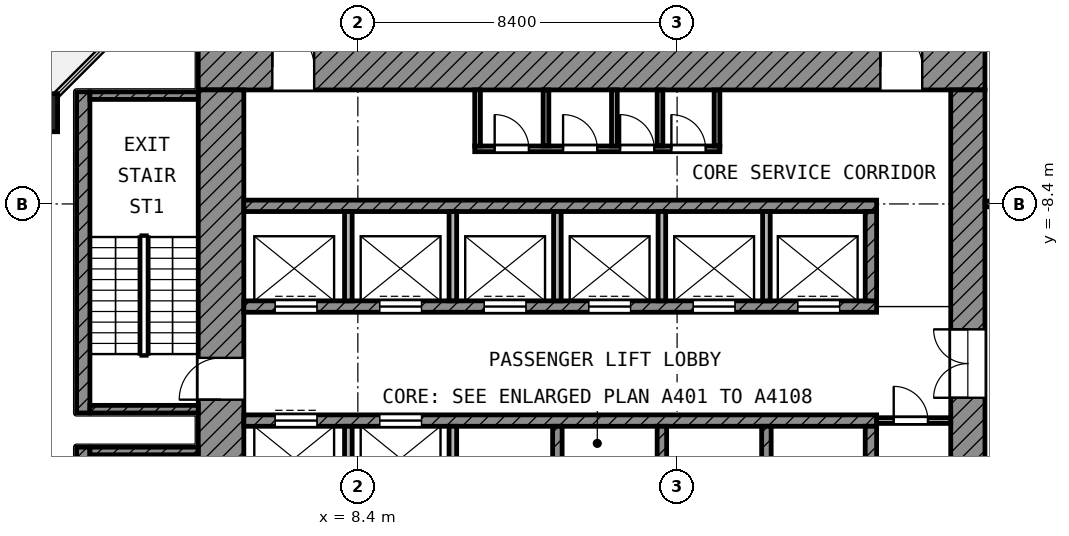
"""IFC4 building model, lengths in metres.
Left out: names, types, materials, properties, quantities, classifications, styles, units other than length and angle.
Written with IfcOpenShell. Run it as: python <this file> out.ifc"""

import sys

from ifc_helpers import new_model, si_unit, direction, frame, frame_2d, origin, origin_2d, place, context, subcontext, project, spatial, rectangle, extrude, element, fill, save


model = new_model("IFC4")
c1 = context("Model", 3, precision=1e-05, world=origin(), true_north=direction((0.0, 1.0)))
c2 = subcontext(c1, "Body", "Model", "MODEL_VIEW")
j1 = project(units=[si_unit("LENGTHUNIT", "METRE"), si_unit("PLANEANGLEUNIT", "RADIAN")], contexts=[c1])
p1 = place(None, origin())
s1 = spatial("IfcSite", under=j1, at=p1, CompositionType="ELEMENT")
p2 = place(p1, origin())
s2 = spatial("IfcBuilding", under=s1, at=p2, CompositionType="ELEMENT")
p3 = place(p2, frame((0.0, 0.0, 158.4)))
s3 = spatial("IfcBuildingStorey", under=s2, at=p3, CompositionType="ELEMENT", Elevation=158.4)
p4 = place(p3, frame((0.0, -6.0, 0.0), z_axis=(0.0, 0.0, 1.0), x_axis=(1.0, 0.0, 0.0)))
e1 = element("IfcColumn", 1, at=p4, inside=s3, PredefinedType="COLUMN", context=c2, shape_type="SweptSolid", body=[
    extrude(rectangle(XDim=1.0, YDim=1.0, at=origin_2d()), origin(), (0.0, 0.0, 1.0), 4.2),
])
p5 = place(p3, frame((4.2, -4.8, 0.0), z_axis=(0.0, 0.0, 1.0), x_axis=(1.0, 0.0, 0.0)))
e2 = element("IfcWall", 2, at=p5, inside=s3, PredefinedType="SHEAR", context=c2, shape_type="SweptSolid", body=[
    extrude(rectangle(XDim=20.7, YDim=1.2, at=frame_2d((10.35, 0.0))), origin(), (0.0, 0.0, 1.0), 3.6),
])
p6 = place(p5, frame((1.95, 0.0, 0.0)))
e3 = element("IfcOpeningElement", 3, at=p6, cuts=e2, PredefinedType="OPENING", context=c2, shape_type="SweptSolid", body=[
    extrude(rectangle(XDim=1.1, YDim=2.1, at=frame_2d((0.55, 1.05))), frame((0.0, 0.61, 0.0), z_axis=(0.0, -1.0, 0.0), x_axis=(1.0, 0.0, 0.0)), (0.0, 0.0, 1.0), 1.22),
])
p7 = place(p5, frame((17.95, 0.0, 0.0)))
e4 = element("IfcOpeningElement", 4, at=p7, cuts=e2, PredefinedType="OPENING", context=c2, shape_type="SweptSolid", body=[
    extrude(rectangle(XDim=1.1, YDim=2.1, at=frame_2d((0.55, 1.05))), frame((0.0, 0.61, 0.0), z_axis=(0.0, -1.0, 0.0), x_axis=(1.0, 0.0, 0.0)), (0.0, 0.0, 1.0), 1.22),
])
p8 = place(p3, frame((4.8, -24.9, 0.0), z_axis=(0.0, 0.0, 1.0), x_axis=(0.0, 1.0, 0.0)))
e5 = element("IfcWall", 5, at=p8, inside=s3, PredefinedType="SHEAR", context=c2, shape_type="SweptSolid", body=[
    extrude(rectangle(XDim=19.5, YDim=1.2, at=frame_2d((9.75, 0.0))), origin(), (0.0, 0.0, 1.0), 3.6),
])
p9 = place(p8, frame((11.35, 0.0, 0.0)))
e6 = element("IfcOpeningElement", 6, at=p9, cuts=e5, PredefinedType="OPENING", context=c2, shape_type="SweptSolid", body=[
    extrude(rectangle(XDim=1.1, YDim=2.1, at=frame_2d((0.55, 1.05))), frame((0.0, 0.61, 0.0), z_axis=(0.0, -1.0, 0.0), x_axis=(1.0, 0.0, 0.0)), (0.0, 0.0, 1.0), 1.22),
])
p10 = place(p8, frame((2.05, 0.0, 0.0)))
e7 = element("IfcOpeningElement", 7, at=p10, cuts=e5, PredefinedType="OPENING", context=c2, shape_type="SweptSolid", body=[
    extrude(rectangle(XDim=1.1, YDim=2.1, at=frame_2d((0.55, 1.05))), frame((0.0, 0.61, 0.0), z_axis=(0.0, -1.0, 0.0), x_axis=(1.0, 0.0, 0.0)), (0.0, 0.0, 1.0), 1.22),
])
p11 = place(p3, frame((24.45, -24.0, 0.0), z_axis=(0.0, 0.0, 1.0), x_axis=(0.0, 1.0, 0.0)))
e8 = element("IfcWall", 8, at=p11, inside=s3, PredefinedType="SHEAR", context=c2, shape_type="SweptSolid", body=[
    extrude(rectangle(XDim=18.6, YDim=0.9, at=frame_2d((9.3, 0.0))), origin(), (0.0, 0.0, 1.0), 3.6),
])
p12 = place(p11, frame((10.5, 0.0, 0.0)))
e9 = element("IfcOpeningElement", 9, at=p12, cuts=e8, PredefinedType="OPENING", context=c2, shape_type="SweptSolid", body=[
    extrude(rectangle(XDim=1.8, YDim=2.1, at=frame_2d((0.9, 1.05))), frame((0.0, 0.46, 0.0), z_axis=(0.0, -1.0, 0.0), x_axis=(1.0, 0.0, 0.0)), (0.0, 0.0, 1.0), 0.92),
])
p13 = place(p3, frame((5.4, -8.45, 0.0), z_axis=(0.0, 0.0, 1.0), x_axis=(1.0, 0.0, 0.0)))
e10 = element("IfcWall", 10, at=p13, inside=s3, PredefinedType="SHEAR", context=c2, shape_type="SweptSolid", body=[
    extrude(rectangle(XDim=16.65, YDim=0.3, at=frame_2d((8.325, 0.0))), origin(), (0.0, 0.0, 1.0), 3.6),
])
p14 = place(p3, frame((5.4, -11.1, 0.0), z_axis=(0.0, 0.0, 1.0), x_axis=(1.0, 0.0, 0.0)))
e11 = element("IfcWall", 11, at=p14, inside=s3, PredefinedType="SHEAR", context=c2, shape_type="SweptSolid", body=[
    extrude(rectangle(XDim=16.65, YDim=0.3, at=frame_2d((8.325, 0.0))), origin(), (0.0, 0.0, 1.0), 3.6),
])
p15 = place(p14, frame((0.825, 0.0, 0.0)))
e12 = element("IfcOpeningElement", 12, at=p15, cuts=e11, PredefinedType="OPENING", context=c2, shape_type="SweptSolid", body=[
    extrude(rectangle(XDim=1.1, YDim=2.1, at=frame_2d((0.55, 1.05))), frame((0.0, 0.16, 0.0), z_axis=(0.0, -1.0, 0.0), x_axis=(1.0, 0.0, 0.0)), (0.0, 0.0, 1.0), 0.32),
])
p16 = place(p14, frame((3.575, 0.0, 0.0)))
e13 = element("IfcOpeningElement", 13, at=p16, cuts=e11, PredefinedType="OPENING", context=c2, shape_type="SweptSolid", body=[
    extrude(rectangle(XDim=1.1, YDim=2.1, at=frame_2d((0.55, 1.05))), frame((0.0, 0.16, 0.0), z_axis=(0.0, -1.0, 0.0), x_axis=(1.0, 0.0, 0.0)), (0.0, 0.0, 1.0), 0.32),
])
p17 = place(p14, frame((6.325, 0.0, 0.0)))
e14 = element("IfcOpeningElement", 14, at=p17, cuts=e11, PredefinedType="OPENING", context=c2, shape_type="SweptSolid", body=[
    extrude(rectangle(XDim=1.1, YDim=2.1, at=frame_2d((0.55, 1.05))), frame((0.0, 0.16, 0.0), z_axis=(0.0, -1.0, 0.0), x_axis=(1.0, 0.0, 0.0)), (0.0, 0.0, 1.0), 0.32),
])
p18 = place(p14, frame((9.075, 0.0, 0.0)))
e15 = element("IfcOpeningElement", 15, at=p18, cuts=e11, PredefinedType="OPENING", context=c2, shape_type="SweptSolid", body=[
    extrude(rectangle(XDim=1.1, YDim=2.1, at=frame_2d((0.55, 1.05))), frame((0.0, 0.16, 0.0), z_axis=(0.0, -1.0, 0.0), x_axis=(1.0, 0.0, 0.0)), (0.0, 0.0, 1.0), 0.32),
])
p19 = place(p14, frame((11.825, 0.0, 0.0)))
e16 = element("IfcOpeningElement", 16, at=p19, cuts=e11, PredefinedType="OPENING", context=c2, shape_type="SweptSolid", body=[
    extrude(rectangle(XDim=1.1, YDim=2.1, at=frame_2d((0.55, 1.05))), frame((0.0, 0.16, 0.0), z_axis=(0.0, -1.0, 0.0), x_axis=(1.0, 0.0, 0.0)), (0.0, 0.0, 1.0), 0.32),
])
p20 = place(p14, frame((14.575, 0.0, 0.0)))
e17 = element("IfcOpeningElement", 17, at=p20, cuts=e11, PredefinedType="OPENING", context=c2, shape_type="SweptSolid", body=[
    extrude(rectangle(XDim=1.1, YDim=2.1, at=frame_2d((0.55, 1.05))), frame((0.0, 0.16, 0.0), z_axis=(0.0, -1.0, 0.0), x_axis=(1.0, 0.0, 0.0)), (0.0, 0.0, 1.0), 0.32),
])
p21 = place(p3, frame((5.4, -14.1, 0.0), z_axis=(0.0, 0.0, 1.0), x_axis=(1.0, 0.0, 0.0)))
e18 = element("IfcWall", 18, at=p21, inside=s3, PredefinedType="SHEAR", context=c2, shape_type="SweptSolid", body=[
    extrude(rectangle(XDim=16.65, YDim=0.3, at=frame_2d((8.325, 0.0))), origin(), (0.0, 0.0, 1.0), 3.6),
])
p22 = place(p21, frame((0.825, 0.0, 0.0)))
e19 = element("IfcOpeningElement", 19, at=p22, cuts=e18, PredefinedType="OPENING", context=c2, shape_type="SweptSolid", body=[
    extrude(rectangle(XDim=1.1, YDim=2.1, at=frame_2d((0.55, 1.05))), frame((0.0, 0.16, 0.0), z_axis=(0.0, -1.0, 0.0), x_axis=(1.0, 0.0, 0.0)), (0.0, 0.0, 1.0), 0.32),
])
p23 = place(p21, frame((3.575, 0.0, 0.0)))
e20 = element("IfcOpeningElement", 20, at=p23, cuts=e18, PredefinedType="OPENING", context=c2, shape_type="SweptSolid", body=[
    extrude(rectangle(XDim=1.1, YDim=2.1, at=frame_2d((0.55, 1.05))), frame((0.0, 0.16, 0.0), z_axis=(0.0, -1.0, 0.0), x_axis=(1.0, 0.0, 0.0)), (0.0, 0.0, 1.0), 0.32),
])
p24 = place(p3, frame((21.9, -10.95, 0.0), z_axis=(0.0, 0.0, 1.0), x_axis=(0.0, 1.0, 0.0)))
e21 = element("IfcWall", 21, at=p24, inside=s3, PredefinedType="SHEAR", context=c2, shape_type="SweptSolid", body=[
    extrude(rectangle(XDim=2.35, YDim=0.3, at=frame_2d((1.175, 0.0))), origin(), (0.0, 0.0, 1.0), 3.6),
])
p25 = place(p3, frame((21.9, -16.6, 0.0), z_axis=(0.0, 0.0, 1.0), x_axis=(0.0, 1.0, 0.0)))
e22 = element("IfcWall", 22, at=p25, inside=s3, PredefinedType="SHEAR", context=c2, shape_type="SweptSolid", body=[
    extrude(rectangle(XDim=2.35, YDim=0.3, at=frame_2d((1.175, 0.0))), origin(), (0.0, 0.0, 1.0), 3.6),
])
for number, where, z_axis, x_axis in (
    (23, (8.15, -10.95, 0.0), (0.0, 0.0, 1.0), (0.0, 1.0, 0.0)),
    (24, (10.9, -10.95, 0.0), (0.0, 0.0, 1.0), (0.0, 1.0, 0.0)),
    (25, (13.65, -10.95, 0.0), (0.0, 0.0, 1.0), (0.0, 1.0, 0.0)),
    (26, (16.4, -10.95, 0.0), (0.0, 0.0, 1.0), (0.0, 1.0, 0.0)),
    (27, (19.15, -10.95, 0.0), (0.0, 0.0, 1.0), (0.0, 1.0, 0.0)),
):
    element("IfcWall", number, at=place(p3, frame(where, z_axis=z_axis, x_axis=x_axis)), inside=s3, PredefinedType="PARTITIONING", context=c2, shape_type="SweptSolid", body=[
        extrude(rectangle(XDim=2.35, YDim=0.2, at=frame_2d((1.175, 0.0))), origin(), (0.0, 0.0, 1.0), 3.6),
    ])
for number, where, z_axis, x_axis in (
    (28, (8.15, -16.6, 0.0), (0.0, 0.0, 1.0), (0.0, 1.0, 0.0)),
    (29, (10.9, -16.6, 0.0), (0.0, 0.0, 1.0), (0.0, 1.0, 0.0)),
):
    element("IfcWall", number, at=place(p3, frame(where, z_axis=z_axis, x_axis=x_axis)), inside=s3, PredefinedType="PARTITIONING", context=c2, shape_type="SweptSolid", body=[
        extrude(rectangle(XDim=2.35, YDim=0.2, at=frame_2d((1.175, 0.0))), origin(), (0.0, 0.0, 1.0), 3.6),
    ])
for number, where, z_axis, x_axis in (
    (30, (13.65, -16.6, 0.0), (0.0, 0.0, 1.0), (0.0, 1.0, 0.0)),
    (31, (16.4, -16.6, 0.0), (0.0, 0.0, 1.0), (0.0, 1.0, 0.0)),
    (32, (19.15, -16.6, 0.0), (0.0, 0.0, 1.0), (0.0, 1.0, 0.0)),
):
    element("IfcWall", number, at=place(p3, frame(where, z_axis=z_axis, x_axis=x_axis)), inside=s3, PredefinedType="SHEAR", context=c2, shape_type="SweptSolid", body=[
        extrude(rectangle(XDim=2.35, YDim=0.25, at=frame_2d((1.175, 0.0))), origin(), (0.0, 0.0, 1.0), 3.6),
    ])
p26 = place(p3, frame((22.05, -14.1, 0.0), z_axis=(0.0, 0.0, 1.0), x_axis=(1.0, 0.0, 0.0)))
e33 = element("IfcWall", 33, at=p26, inside=s3, PredefinedType="PARTITIONING", context=c2, shape_type="SweptSolid", body=[
    extrude(rectangle(XDim=1.95, YDim=0.15, at=frame_2d((0.975, 0.0))), origin(), (0.0, 0.0, 1.0), 3.6),
])
p27 = place(p26, frame((0.45, 0.0, 0.0)))
e34 = element("IfcOpeningElement", 34, at=p27, cuts=e33, PredefinedType="OPENING", context=c2, shape_type="SweptSolid", body=[
    extrude(rectangle(XDim=0.9, YDim=2.1, at=frame_2d((0.45, 1.05))), frame((0.0, 0.085, 0.0), z_axis=(0.0, -1.0, 0.0), x_axis=(1.0, 0.0, 0.0)), (0.0, 0.0, 1.0), 0.17),
])
p28 = place(p3, frame((11.475, -6.95, 0.0), z_axis=(0.0, 0.0, 1.0), x_axis=(1.0, 0.0, 0.0)))
e35 = element("IfcWall", 35, at=p28, inside=s3, PredefinedType="PARTITIONING", context=c2, shape_type="SweptSolid", body=[
    extrude(rectangle(XDim=6.45, YDim=0.15, at=frame_2d((3.225, 0.0))), origin(), (0.0, 0.0, 1.0), 3.6),
])
p29 = place(p28, frame((0.525, 0.0, 0.0)))
e36 = element("IfcOpeningElement", 36, at=p29, cuts=e35, PredefinedType="OPENING", context=c2, shape_type="SweptSolid", body=[
    extrude(rectangle(XDim=0.9, YDim=2.1, at=frame_2d((0.45, 1.05))), frame((0.0, 0.085, 0.0), z_axis=(0.0, -1.0, 0.0), x_axis=(1.0, 0.0, 0.0)), (0.0, 0.0, 1.0), 0.17),
])
p30 = place(p28, frame((2.325, 0.0, 0.0)))
e37 = element("IfcOpeningElement", 37, at=p30, cuts=e35, PredefinedType="OPENING", context=c2, shape_type="SweptSolid", body=[
    extrude(rectangle(XDim=0.9, YDim=2.1, at=frame_2d((0.45, 1.05))), frame((0.0, 0.085, 0.0), z_axis=(0.0, -1.0, 0.0), x_axis=(1.0, 0.0, 0.0)), (0.0, 0.0, 1.0), 0.17),
])
p31 = place(p28, frame((3.825, 0.0, 0.0)))
e38 = element("IfcOpeningElement", 38, at=p31, cuts=e35, PredefinedType="OPENING", context=c2, shape_type="SweptSolid", body=[
    extrude(rectangle(XDim=0.9, YDim=2.1, at=frame_2d((0.45, 1.05))), frame((0.0, 0.085, 0.0), z_axis=(0.0, -1.0, 0.0), x_axis=(1.0, 0.0, 0.0)), (0.0, 0.0, 1.0), 0.17),
])
p32 = place(p28, frame((5.175, 0.0, 0.0)))
e39 = element("IfcOpeningElement", 39, at=p32, cuts=e35, PredefinedType="OPENING", context=c2, shape_type="SweptSolid", body=[
    extrude(rectangle(XDim=0.9, YDim=2.1, at=frame_2d((0.45, 1.05))), frame((0.0, 0.085, 0.0), z_axis=(0.0, -1.0, 0.0), x_axis=(1.0, 0.0, 0.0)), (0.0, 0.0, 1.0), 0.17),
])
for number, where, z_axis, x_axis in (
    (40, (11.55, -6.875, 0.0), (0.0, 0.0, 1.0), (0.0, 1.0, 0.0)),
    (41, (13.35, -6.875, 0.0), (0.0, 0.0, 1.0), (0.0, 1.0, 0.0)),
    (42, (15.15, -6.875, 0.0), (0.0, 0.0, 1.0), (0.0, 1.0, 0.0)),
    (43, (16.35, -6.875, 0.0), (0.0, 0.0, 1.0), (0.0, 1.0, 0.0)),
    (44, (17.85, -6.875, 0.0), (0.0, 0.0, 1.0), (0.0, 1.0, 0.0)),
):
    element("IfcWall", number, at=place(p3, frame(where, z_axis=z_axis, x_axis=x_axis)), inside=s3, PredefinedType="PARTITIONING", context=c2, shape_type="SweptSolid", body=[
        extrude(rectangle(XDim=1.475, YDim=0.15, at=frame_2d((0.738, 0.0))), origin(), (0.0, 0.0, 1.0), 3.6),
    ])
p33 = place(p3, frame((1.175, -13.9, 0.0), z_axis=(0.0, 0.0, 1.0), x_axis=(0.0, 1.0, 0.0)))
e45 = element("IfcWall", 45, at=p33, inside=s3, PredefinedType="SHEAR", context=c2, shape_type="SweptSolid", body=[
    extrude(rectangle(XDim=8.45, YDim=0.35, at=frame_2d((4.225, 0.0))), origin(), (0.0, 0.0, 1.0), 3.6),
])
for number, where, z_axis, x_axis in (
    (46, (1.35, -5.55, 0.0), (0.0, 0.0, 1.0), (1.0, 0.0, 0.0)),
    (47, (1.35, -13.8, 0.0), (0.0, 0.0, 1.0), (1.0, 0.0, 0.0)),
):
    element("IfcWall", number, at=place(p3, frame(where, z_axis=z_axis, x_axis=x_axis)), inside=s3, PredefinedType="SHEAR", context=c2, shape_type="SweptSolid", body=[
        extrude(rectangle(XDim=2.85, YDim=0.2, at=frame_2d((1.425, 0.0))), origin(), (0.0, 0.0, 1.0), 3.6),
    ])
p34 = place(p3, frame((1.175, -23.25, 0.0), z_axis=(0.0, 0.0, 1.0), x_axis=(0.0, 1.0, 0.0)))
e48 = element("IfcWall", 48, at=p34, inside=s3, PredefinedType="SHEAR", context=c2, shape_type="SweptSolid", body=[
    extrude(rectangle(XDim=8.45, YDim=0.35, at=frame_2d((4.225, 0.0))), origin(), (0.0, 0.0, 1.0), 3.6),
])
p35 = place(p3, frame((1.35, -14.9, 0.0), z_axis=(0.0, 0.0, 1.0), x_axis=(1.0, 0.0, 0.0)))
e49 = element("IfcWall", 49, at=p35, inside=s3, PredefinedType="SHEAR", context=c2, shape_type="SweptSolid", body=[
    extrude(rectangle(XDim=2.85, YDim=0.2, at=frame_2d((1.425, 0.0))), origin(), (0.0, 0.0, 1.0), 3.6),
])
p36 = place(p3, frame((24.9, -8.4, 0.0), z_axis=(0.0, 0.0, 1.0), x_axis=(1.0, 0.0, 0.0)))
e50 = element("IfcWall", 50, at=p36, inside=s3, PredefinedType="PARTITIONING", context=c2, shape_type="SweptSolid", body=[
    extrude(rectangle(XDim=15.357, YDim=0.15, at=frame_2d((7.679, 0.0))), origin(), (0.0, 0.0, 1.0), 3.6),
])
p37 = place(p36, frame((0.85, 0.0, 0.0)))
e51 = element("IfcOpeningElement", 51, at=p37, cuts=e50, PredefinedType="OPENING", context=c2, shape_type="SweptSolid", body=[
    extrude(rectangle(XDim=1.0, YDim=2.1, at=frame_2d((0.5, 1.05))), frame((0.0, 0.085, 0.0), z_axis=(0.0, -1.0, 0.0), x_axis=(1.0, 0.0, 0.0)), (0.0, 0.0, 1.0), 0.17),
])
p38 = place(p36, frame((9.229, 0.0, 0.0)))
e52 = element("IfcOpeningElement", 52, at=p38, cuts=e50, PredefinedType="OPENING", context=c2, shape_type="SweptSolid", body=[
    extrude(rectangle(XDim=1.5, YDim=2.1, at=frame_2d((0.75, 1.05))), frame((0.0, 0.085, 0.0), z_axis=(0.0, -1.0, 0.0), x_axis=(1.0, 0.0, 0.0)), (0.0, 0.0, 1.0), 0.17),
])
p39 = place(p15, origin())
e53 = element("IfcDoor", 53, at=p39, inside=s3, OperationType="DOUBLE_DOOR_SLIDING", PredefinedType="DOOR", context=c2, shape_type="SweptSolid", body=[
    extrude(rectangle(XDim=1.1, YDim=2.1, at=frame_2d((0.55, 1.05))), frame((0.0, 0.025, 0.0), z_axis=(0.0, -1.0, 0.0), x_axis=(1.0, 0.0, 0.0)), (0.0, 0.0, 1.0), 0.05),
])
fill(e12, e53)
p40 = place(p16, origin())
e54 = element("IfcDoor", 54, at=p40, inside=s3, OperationType="DOUBLE_DOOR_SLIDING", PredefinedType="DOOR", context=c2, shape_type="SweptSolid", body=[
    extrude(rectangle(XDim=1.1, YDim=2.1, at=frame_2d((0.55, 1.05))), frame((0.0, 0.025, 0.0), z_axis=(0.0, -1.0, 0.0), x_axis=(1.0, 0.0, 0.0)), (0.0, 0.0, 1.0), 0.05),
])
fill(e13, e54)
p41 = place(p17, origin())
e55 = element("IfcDoor", 55, at=p41, inside=s3, OperationType="DOUBLE_DOOR_SLIDING", PredefinedType="DOOR", context=c2, shape_type="SweptSolid", body=[
    extrude(rectangle(XDim=1.1, YDim=2.1, at=frame_2d((0.55, 1.05))), frame((0.0, 0.025, 0.0), z_axis=(0.0, -1.0, 0.0), x_axis=(1.0, 0.0, 0.0)), (0.0, 0.0, 1.0), 0.05),
])
fill(e14, e55)
p42 = place(p18, origin())
e56 = element("IfcDoor", 56, at=p42, inside=s3, OperationType="DOUBLE_DOOR_SLIDING", PredefinedType="DOOR", context=c2, shape_type="SweptSolid", body=[
    extrude(rectangle(XDim=1.1, YDim=2.1, at=frame_2d((0.55, 1.05))), frame((0.0, 0.025, 0.0), z_axis=(0.0, -1.0, 0.0), x_axis=(1.0, 0.0, 0.0)), (0.0, 0.0, 1.0), 0.05),
])
fill(e15, e56)
p43 = place(p19, origin())
e57 = element("IfcDoor", 57, at=p43, inside=s3, OperationType="DOUBLE_DOOR_SLIDING", PredefinedType="DOOR", context=c2, shape_type="SweptSolid", body=[
    extrude(rectangle(XDim=1.1, YDim=2.1, at=frame_2d((0.55, 1.05))), frame((0.0, 0.025, 0.0), z_axis=(0.0, -1.0, 0.0), x_axis=(1.0, 0.0, 0.0)), (0.0, 0.0, 1.0), 0.05),
])
fill(e16, e57)
p44 = place(p20, origin())
e58 = element("IfcDoor", 58, at=p44, inside=s3, OperationType="DOUBLE_DOOR_SLIDING", PredefinedType="DOOR", context=c2, shape_type="SweptSolid", body=[
    extrude(rectangle(XDim=1.1, YDim=2.1, at=frame_2d((0.55, 1.05))), frame((0.0, 0.025, 0.0), z_axis=(0.0, -1.0, 0.0), x_axis=(1.0, 0.0, 0.0)), (0.0, 0.0, 1.0), 0.05),
])
fill(e17, e58)
p45 = place(p22, origin())
e59 = element("IfcDoor", 59, at=p45, inside=s3, OperationType="DOUBLE_DOOR_SLIDING", PredefinedType="DOOR", context=c2, shape_type="SweptSolid", body=[
    extrude(rectangle(XDim=1.1, YDim=2.1, at=frame_2d((0.55, 1.05))), frame((0.0, 0.025, 0.0), z_axis=(0.0, -1.0, 0.0), x_axis=(1.0, 0.0, 0.0)), (0.0, 0.0, 1.0), 0.05),
])
fill(e19, e59)
p46 = place(p23, origin())
e60 = element("IfcDoor", 60, at=p46, inside=s3, OperationType="DOUBLE_DOOR_SLIDING", PredefinedType="DOOR", context=c2, shape_type="SweptSolid", body=[
    extrude(rectangle(XDim=1.1, YDim=2.1, at=frame_2d((0.55, 1.05))), frame((0.0, 0.025, 0.0), z_axis=(0.0, -1.0, 0.0), x_axis=(1.0, 0.0, 0.0)), (0.0, 0.0, 1.0), 0.05),
])
fill(e20, e60)
p47 = place(p9, origin())
e61 = element("IfcDoor", 61, at=p47, inside=s3, OperationType="SINGLE_SWING_LEFT", PredefinedType="DOOR", context=c2, shape_type="SweptSolid", body=[
    extrude(rectangle(XDim=1.1, YDim=2.1, at=frame_2d((0.55, 1.05))), frame((0.0, 0.025, 0.0), z_axis=(0.0, -1.0, 0.0), x_axis=(1.0, 0.0, 0.0)), (0.0, 0.0, 1.0), 0.05),
])
fill(e6, e61)
p48 = place(p6, origin())
e62 = element("IfcDoor", 62, at=p48, inside=s3, OperationType="SINGLE_SWING_LEFT", PredefinedType="DOOR", context=c2, shape_type="SweptSolid", body=[
    extrude(rectangle(XDim=1.1, YDim=2.1, at=frame_2d((0.55, 1.05))), frame((0.0, 0.025, 0.0), z_axis=(0.0, -1.0, 0.0), x_axis=(1.0, 0.0, 0.0)), (0.0, 0.0, 1.0), 0.05),
])
fill(e3, e62)
p49 = place(p7, origin())
e63 = element("IfcDoor", 63, at=p49, inside=s3, OperationType="SINGLE_SWING_LEFT", PredefinedType="DOOR", context=c2, shape_type="SweptSolid", body=[
    extrude(rectangle(XDim=1.1, YDim=2.1, at=frame_2d((0.55, 1.05))), frame((0.0, 0.025, 0.0), z_axis=(0.0, -1.0, 0.0), x_axis=(1.0, 0.0, 0.0)), (0.0, 0.0, 1.0), 0.05),
])
fill(e4, e63)
p50 = place(p12, origin())
e64 = element("IfcDoor", 64, at=p50, inside=s3, OperationType="DOUBLE_DOOR_SINGLE_SWING", PredefinedType="DOOR", context=c2, shape_type="SweptSolid", body=[
    extrude(rectangle(XDim=1.8, YDim=2.1, at=frame_2d((0.9, 1.05))), frame((0.0, 0.025, 0.0), z_axis=(0.0, -1.0, 0.0), x_axis=(1.0, 0.0, 0.0)), (0.0, 0.0, 1.0), 0.05),
])
fill(e9, e64)
p51 = place(p29, origin())
e65 = element("IfcDoor", 65, at=p51, inside=s3, OperationType="SINGLE_SWING_LEFT", PredefinedType="DOOR", context=c2, shape_type="SweptSolid", body=[
    extrude(rectangle(XDim=0.9, YDim=2.1, at=frame_2d((0.45, 1.05))), frame((0.0, 0.025, 0.0), z_axis=(0.0, -1.0, 0.0), x_axis=(1.0, 0.0, 0.0)), (0.0, 0.0, 1.0), 0.05),
])
fill(e36, e65)
p52 = place(p30, origin())
e66 = element("IfcDoor", 66, at=p52, inside=s3, OperationType="SINGLE_SWING_LEFT", PredefinedType="DOOR", context=c2, shape_type="SweptSolid", body=[
    extrude(rectangle(XDim=0.9, YDim=2.1, at=frame_2d((0.45, 1.05))), frame((0.0, 0.025, 0.0), z_axis=(0.0, -1.0, 0.0), x_axis=(1.0, 0.0, 0.0)), (0.0, 0.0, 1.0), 0.05),
])
fill(e37, e66)
p53 = place(p31, origin())
e67 = element("IfcDoor", 67, at=p53, inside=s3, OperationType="SINGLE_SWING_LEFT", PredefinedType="DOOR", context=c2, shape_type="SweptSolid", body=[
    extrude(rectangle(XDim=0.9, YDim=2.1, at=frame_2d((0.45, 1.05))), frame((0.0, 0.025, 0.0), z_axis=(0.0, -1.0, 0.0), x_axis=(1.0, 0.0, 0.0)), (0.0, 0.0, 1.0), 0.05),
])
fill(e38, e67)
p54 = place(p32, origin())
e68 = element("IfcDoor", 68, at=p54, inside=s3, OperationType="SINGLE_SWING_LEFT", PredefinedType="DOOR", context=c2, shape_type="SweptSolid", body=[
    extrude(rectangle(XDim=0.9, YDim=2.1, at=frame_2d((0.45, 1.05))), frame((0.0, 0.025, 0.0), z_axis=(0.0, -1.0, 0.0), x_axis=(1.0, 0.0, 0.0)), (0.0, 0.0, 1.0), 0.05),
])
fill(e39, e68)
p55 = place(p27, origin())
e69 = element("IfcDoor", 69, at=p55, inside=s3, OperationType="SINGLE_SWING_LEFT", PredefinedType="DOOR", context=c2, shape_type="SweptSolid", body=[
    extrude(rectangle(XDim=0.9, YDim=2.1, at=frame_2d((0.45, 1.05))), frame((0.0, 0.025, 0.0), z_axis=(0.0, -1.0, 0.0), x_axis=(1.0, 0.0, 0.0)), (0.0, 0.0, 1.0), 0.05),
])
fill(e34, e69)
save(model, sys.argv[1])
